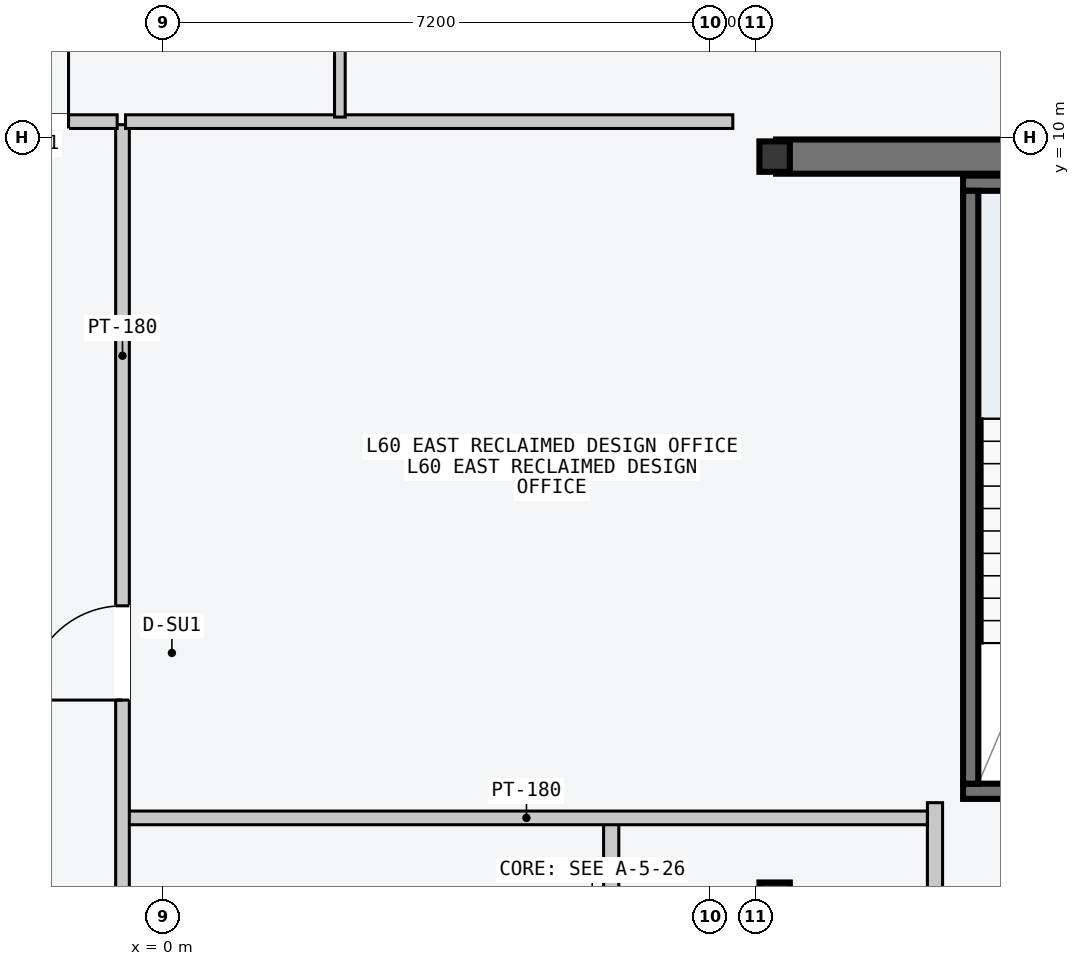
"""IFC4 building model, lengths in metres.
Left out: names, types, materials, properties, quantities, classifications, styles, units other than length and angle.
Written with IfcOpenShell. Run it as: python <this file> out.ifc"""

import sys

from ifc_helpers import new_model, si_unit, direction, frame, frame_2d, origin, origin_2d, place, context, subcontext, project, spatial, rectangle, i_section, extrude, element, fill, save


model = new_model("IFC4")
c1 = context("Model", 3, precision=1e-05, world=origin(), true_north=direction((0.0, 1.0)))
c2 = subcontext(c1, "Body", "Model", "MODEL_VIEW")
j1 = project(units=[si_unit("LENGTHUNIT", "METRE"), si_unit("PLANEANGLEUNIT", "RADIAN")], contexts=[c1])
p1 = place(None, origin())
s1 = spatial("IfcSite", under=j1, at=p1, CompositionType="ELEMENT")
p2 = place(p1, origin())
s2 = spatial("IfcBuilding", under=s1, at=p2, CompositionType="ELEMENT")
p3 = place(p2, frame((0.0, 0.0, 229.2)))
s3 = spatial("IfcBuildingStorey", under=s2, at=p3, CompositionType="ELEMENT", Elevation=229.2)
p4 = place(p3, frame((8.07, 9.75, -0.2), z_axis=(0.0, 0.0, 1.0), x_axis=(1.0, 0.0, 0.0)))
e1 = element("IfcWall", 1, at=p4, inside=s3, PredefinedType="SHEAR", context=c2, shape_type="SweptSolid", body=[
    extrude(rectangle(XDim=6.46, YDim=0.45, at=frame_2d((3.23, 0.0))), origin(), (0.0, 0.0, 1.0), 3.6),
])
p5 = place(p3, frame((10.53, 1.4, -0.2), z_axis=(0.0, 0.0, 1.0), x_axis=(1.0, 0.0, 0.0)))
e2 = element("IfcWall", 2, at=p5, inside=s3, PredefinedType="SOLIDWALL", context=c2, shape_type="SweptSolid", body=[
    extrude(rectangle(XDim=3.72, YDim=0.2, at=frame_2d((1.86, 0.0))), origin(), (0.0, 0.0, 1.0), 3.6),
])
p6 = place(p5, frame((1.5, 0.0, 0.2)))
e3 = element("IfcOpeningElement", 3, at=p6, cuts=e2, PredefinedType="OPENING", context=c2, shape_type="SweptSolid", body=[
    extrude(rectangle(XDim=1.12, YDim=2.18, at=frame_2d((0.56, 1.09))), frame((0.0, 0.11, 0.0), z_axis=(0.0, -1.0, 0.0), x_axis=(1.0, 0.0, 0.0)), (0.0, 0.0, 1.0), 0.22),
])
p7 = place(p3, frame((10.53, 9.4, -0.2), z_axis=(0.0, 0.0, 1.0), x_axis=(1.0, 0.0, 0.0)))
e4 = element("IfcWall", 4, at=p7, inside=s3, PredefinedType="SOLIDWALL", context=c2, shape_type="SweptSolid", body=[
    extrude(rectangle(XDim=3.72, YDim=0.2, at=frame_2d((1.86, 0.0))), origin(), (0.0, 0.0, 1.0), 3.6),
])
p8 = place(p3, frame((10.63, 1.5, -0.2), z_axis=(0.0, 0.0, 1.0), x_axis=(0.0, 1.0, 0.0)))
e5 = element("IfcWall", 5, at=p8, inside=s3, PredefinedType="SOLIDWALL", context=c2, shape_type="SweptSolid", body=[
    extrude(rectangle(XDim=7.8, YDim=0.2, at=frame_2d((3.9, 0.0))), origin(), (0.0, 0.0, 1.0), 3.6),
])
for number, where, z_axis, x_axis in (
    (6, (8.05, 0.0, 0.0), (0.0, 0.0, 1.0), (1.0, 0.0, 0.0)),
    (7, (8.05, 9.75, 0.0), (0.0, 0.0, 1.0), (1.0, 0.0, 0.0)),
):
    element("IfcColumn", number, at=place(p3, frame(where, z_axis=z_axis, x_axis=x_axis)), inside=s3, PredefinedType="COLUMN", context=c2, shape_type="SweptSolid", body=[
        extrude(i_section(OverallWidth=0.4, OverallDepth=0.4, WebThickness=0.013, FlangeThickness=0.021, at=origin_2d()), origin(), (0.0, 0.0, 1.0), 3.6),
    ])
p9 = place(p3, frame((5.9, -9.45, 0.0), z_axis=(0.0, 0.0, 1.0), x_axis=(0.0, 1.0, 0.0)))
e8 = element("IfcWall", 8, at=p9, inside=s3, PredefinedType="PARTITIONING", context=c2, shape_type="SweptSolid", body=[
    extrude(rectangle(XDim=10.5, YDim=0.2, at=frame_2d((5.25, 0.0))), origin(), (0.0, 0.0, 1.0), 3.4),
])
p10 = place(p9, frame((3.9, 0.0, 0.0)))
e9 = element("IfcOpeningElement", 9, at=p10, cuts=e8, PredefinedType="OPENING", context=c2, shape_type="SweptSolid", body=[
    extrude(rectangle(XDim=1.5, YDim=2.2, at=frame_2d((0.75, 1.1))), frame((0.0, 0.11, 0.0), z_axis=(0.0, -1.0, 0.0), x_axis=(1.0, 0.0, 0.0)), (0.0, 0.0, 1.0), 0.22),
])
p11 = place(p3, frame((10.16, -2.55, 0.0), z_axis=(0.0, 0.0, 1.0), x_axis=(0.0, 1.0, 0.0)))
e10 = element("IfcWall", 10, at=p11, inside=s3, PredefinedType="PARTITIONING", context=c2, shape_type="SweptSolid", body=[
    extrude(rectangle(XDim=3.8, YDim=0.2, at=frame_2d((1.9, 0.0))), origin(), (0.0, 0.0, 1.0), 3.4),
])
p12 = place(p11, frame((1.3, 0.0, 0.0)))
e11 = element("IfcOpeningElement", 11, at=p12, cuts=e10, PredefinedType="OPENING", context=c2, shape_type="SweptSolid", body=[
    extrude(rectangle(XDim=1.1, YDim=2.15, at=frame_2d((0.55, 1.075))), frame((0.0, 0.11, 0.0), z_axis=(0.0, -1.0, 0.0), x_axis=(1.0, 0.0, 0.0)), (0.0, 0.0, 1.0), 0.22),
])
p13 = place(p3, frame((-0.49, 1.05, 0.0), z_axis=(0.0, 0.0, 1.0), x_axis=(1.0, 0.0, 0.0)))
e12 = element("IfcWall", 12, at=p13, inside=s3, PredefinedType="PARTITIONING", context=c2, shape_type="SweptSolid", body=[
    extrude(rectangle(XDim=10.55, YDim=0.18, at=frame_2d((5.275, 0.0))), origin(), (0.0, 0.0, 1.0), 3.4),
])
p14 = place(p3, frame((-0.53, -3.5, 0.0), z_axis=(0.0, 0.0, 1.0), x_axis=(0.0, 1.0, 0.0)))
e13 = element("IfcWall", 13, at=p14, inside=s3, PredefinedType="PARTITIONING", context=c2, shape_type="SweptSolid", body=[
    extrude(rectangle(XDim=13.67, YDim=0.18, at=frame_2d((6.835, 0.0))), origin(), (0.0, 0.0, 1.0), 3.4),
])
p15 = place(p14, frame((6.1, 0.0, 0.0)))
e14 = element("IfcOpeningElement", 14, at=p15, cuts=e13, PredefinedType="OPENING", context=c2, shape_type="SweptSolid", body=[
    extrude(rectangle(XDim=1.24, YDim=2.24, at=frame_2d((0.62, 1.12))), frame((0.0, 0.1, 0.0), z_axis=(0.0, -1.0, 0.0), x_axis=(1.0, 0.0, 0.0)), (0.0, 0.0, 1.0), 0.2),
])
p16 = place(p14, frame((1.6, 0.0, 0.0)))
e15 = element("IfcOpeningElement", 15, at=p16, cuts=e13, PredefinedType="OPENING", context=c2, shape_type="SweptSolid", body=[
    extrude(rectangle(XDim=0.96, YDim=2.18, at=frame_2d((0.48, 1.09))), frame((0.0, 0.1, 0.0), z_axis=(0.0, -1.0, 0.0), x_axis=(1.0, 0.0, 0.0)), (0.0, 0.0, 1.0), 0.2),
])
p17 = place(p3, frame((-0.49, 10.21, 0.0), z_axis=(0.0, 0.0, 1.0), x_axis=(1.0, 0.0, 0.0)))
e16 = element("IfcWall", 16, at=p17, inside=s3, PredefinedType="PARTITIONING", context=c2, shape_type="SweptSolid", body=[
    extrude(rectangle(XDim=7.99, YDim=0.18, at=frame_2d((3.995, 0.0))), origin(), (0.0, 0.0, 1.0), 3.4),
])
p18 = place(p3, frame((2.33, 10.27, 0.0), z_axis=(0.0, 0.0, 1.0), x_axis=(0.0, 1.0, 0.0)))
e17 = element("IfcWall", 17, at=p18, inside=s3, PredefinedType="PARTITIONING", context=c2, shape_type="SweptSolid", body=[
    extrude(rectangle(XDim=6.28, YDim=0.14, at=frame_2d((3.14, 0.0))), origin(), (0.0, 0.0, 1.0), 3.4),
])
p19 = place(p18, frame((1.15, 0.0, 0.0)))
e18 = element("IfcOpeningElement", 18, at=p19, cuts=e17, PredefinedType="OPENING", context=c2, shape_type="SweptSolid", body=[
    extrude(rectangle(XDim=0.96, YDim=2.18, at=frame_2d((0.48, 1.09))), frame((0.0, 0.08, 0.0), z_axis=(0.0, -1.0, 0.0), x_axis=(1.0, 0.0, 0.0)), (0.0, 0.0, 1.0), 0.16),
])
p20 = place(p3, frame((-2.9, 10.21, 0.0), z_axis=(0.0, 0.0, 1.0), x_axis=(1.0, 0.0, 0.0)))
e19 = element("IfcWall", 19, at=p20, inside=s3, PredefinedType="PARTITIONING", context=c2, shape_type="SweptSolid", body=[
    extrude(rectangle(XDim=2.3, YDim=0.18, at=frame_2d((1.15, 0.0))), origin(), (0.0, 0.0, 1.0), 3.4),
])
p21 = place(p20, frame((0.64, 0.0, 0.0)))
e20 = element("IfcOpeningElement", 20, at=p21, cuts=e19, PredefinedType="OPENING", context=c2, shape_type="SweptSolid", body=[
    extrude(rectangle(XDim=1.02, YDim=2.2, at=frame_2d((0.51, 1.1))), frame((0.0, 0.1, 0.0), z_axis=(0.0, -1.0, 0.0), x_axis=(1.0, 0.0, 0.0)), (0.0, 0.0, 1.0), 0.2),
])
p22 = place(p15, origin())
e21 = element("IfcDoor", 21, at=p22, inside=s3, OperationType="SINGLE_SWING_LEFT", PredefinedType="DOOR", context=c2, shape_type="SweptSolid", body=[
    extrude(rectangle(XDim=1.24, YDim=2.24, at=frame_2d((0.62, 1.12))), frame((0.0, 0.025, 0.0), z_axis=(0.0, -1.0, 0.0), x_axis=(1.0, 0.0, 0.0)), (0.0, 0.0, 1.0), 0.05),
])
fill(e14, e21)
p23 = place(p21, origin())
e22 = element("IfcDoor", 22, at=p23, inside=s3, OperationType="SINGLE_SWING_RIGHT", PredefinedType="DOOR", context=c2, shape_type="SweptSolid", body=[
    extrude(rectangle(XDim=1.02, YDim=2.2, at=frame_2d((0.51, 1.1))), frame((0.0, 0.025, 0.0), z_axis=(0.0, -1.0, 0.0), x_axis=(1.0, 0.0, 0.0)), (0.0, 0.0, 1.0), 0.05),
])
fill(e20, e22)
save(model, sys.argv[1])
